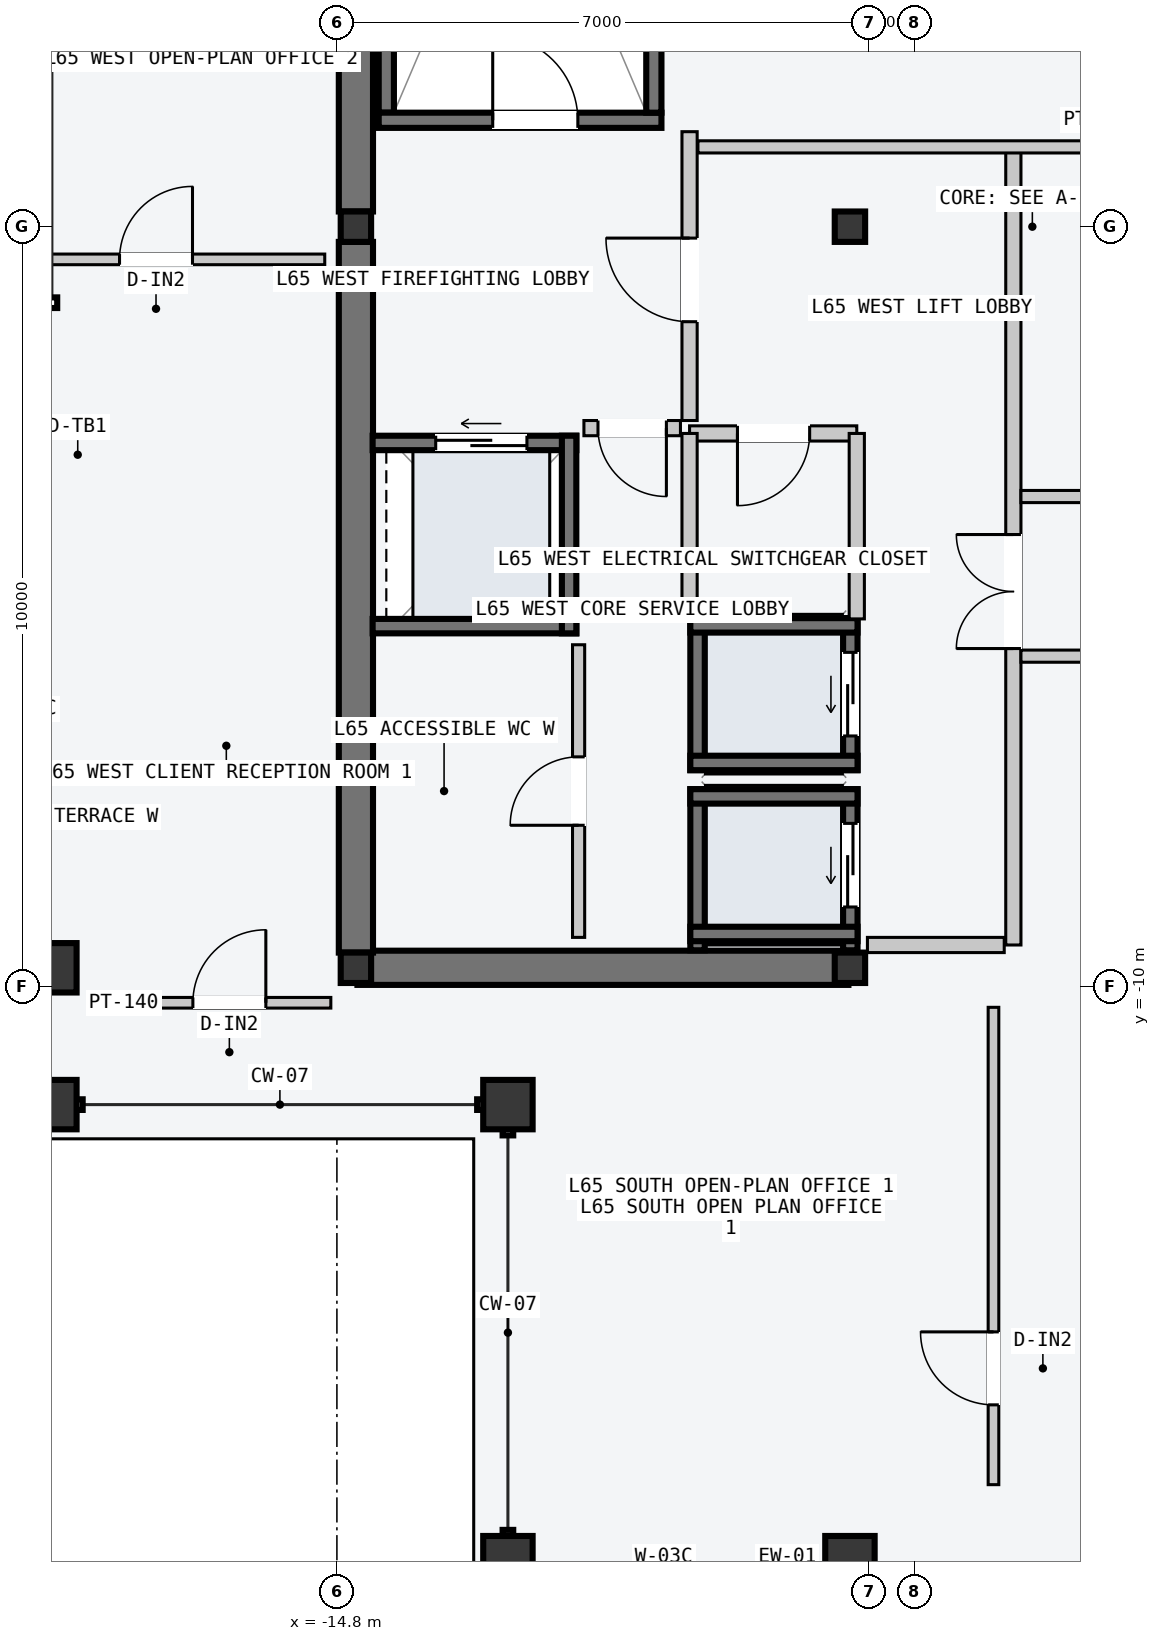
"""IFC4 building model, lengths in metres.
Left out: names, types, materials, properties, quantities, classifications, styles, units other than length and angle.
Written with IfcOpenShell. Run it as: python <this file> out.ifc"""

import sys

from ifc_helpers import new_model, si_unit, direction, frame, frame_2d, origin, origin_2d, place, context, subcontext, project, spatial, rectangle, hollow_rectangle, i_section, extrude, element, fill, save


model = new_model("IFC4")
c1 = context("Model", 3, precision=1e-05, world=origin(), true_north=direction((0.0, 1.0)))
c2 = subcontext(c1, "Body", "Model", "MODEL_VIEW")
j1 = project(units=[si_unit("LENGTHUNIT", "METRE"), si_unit("PLANEANGLEUNIT", "RADIAN")], contexts=[c1])
p1 = place(None, origin())
s1 = spatial("IfcSite", under=j1, at=p1, CompositionType="ELEMENT")
p2 = place(p1, origin())
s2 = spatial("IfcBuilding", under=s1, at=p2, CompositionType="ELEMENT")
p3 = place(p2, frame((0.0, 0.0, 247.2)))
s3 = spatial("IfcBuildingStorey", under=s2, at=p3, CompositionType="ELEMENT", Elevation=247.2)
p4 = place(p3, frame((-14.53, -9.75, -0.2), z_axis=(0.0, 0.0, 1.0), x_axis=(1.0, 0.0, 0.0)))
e1 = element("IfcWall", 1, at=p4, inside=s3, PredefinedType="SHEAR", context=c2, shape_type="SweptSolid", body=[
    extrude(rectangle(XDim=6.46, YDim=0.45, at=frame_2d((3.23, 0.0))), origin(), (0.0, 0.0, 1.0), 3.6),
])
for number, where, z_axis, x_axis in (
    (2, (-14.55, -9.55, -0.2), (0.0, 0.0, 1.0), (0.0, 1.0, 0.0)),
    (3, (-14.55, 0.2, -0.2), (0.0, 0.0, 1.0), (0.0, 1.0, 0.0)),
):
    element("IfcWall", number, at=place(p3, frame(where, z_axis=z_axis, x_axis=x_axis)), inside=s3, PredefinedType="SHEAR", context=c2, shape_type="SweptSolid", body=[
        extrude(rectangle(XDim=9.35, YDim=0.45, at=frame_2d((4.675, 0.0))), origin(), (0.0, 0.0, 1.0), 3.6),
    ])
p5 = place(p3, frame((-14.15, 1.5, -0.2), z_axis=(0.0, 0.0, 1.0), x_axis=(0.0, 1.0, 0.0)))
e4 = element("IfcWall", 4, at=p5, inside=s3, PredefinedType="SOLIDWALL", context=c2, shape_type="SweptSolid", body=[
    extrude(rectangle(XDim=7.8, YDim=0.2, at=frame_2d((3.9, 0.0))), origin(), (0.0, 0.0, 1.0), 3.6),
])
p6 = place(p3, frame((-14.25, 1.4, -0.2), z_axis=(0.0, 0.0, 1.0), x_axis=(1.0, 0.0, 0.0)))
e5 = element("IfcWall", 5, at=p6, inside=s3, PredefinedType="SOLIDWALL", context=c2, shape_type="SweptSolid", body=[
    extrude(rectangle(XDim=3.72, YDim=0.2, at=frame_2d((1.86, 0.0))), origin(), (0.0, 0.0, 1.0), 3.6),
])
p7 = place(p6, frame((1.5, 0.0, 0.2)))
e6 = element("IfcOpeningElement", 6, at=p7, cuts=e5, PredefinedType="OPENING", context=c2, shape_type="SweptSolid", body=[
    extrude(rectangle(XDim=1.12, YDim=2.18, at=frame_2d((0.56, 1.09))), frame((0.0, 0.11, 0.0), z_axis=(0.0, -1.0, 0.0), x_axis=(1.0, 0.0, 0.0)), (0.0, 0.0, 1.0), 0.22),
])
p8 = place(p3, frame((-10.63, 1.5, -0.2), z_axis=(0.0, 0.0, 1.0), x_axis=(0.0, 1.0, 0.0)))
e7 = element("IfcWall", 7, at=p8, inside=s3, PredefinedType="SOLIDWALL", context=c2, shape_type="SweptSolid", body=[
    extrude(rectangle(XDim=7.8, YDim=0.2, at=frame_2d((3.9, 0.0))), origin(), (0.0, 0.0, 1.0), 3.6),
])
for number, where, z_axis, x_axis in (
    (8, (-14.55, -9.75, 0.0), (0.0, 0.0, 1.0), (1.0, 0.0, 0.0)),
    (9, (-14.55, 0.0, 0.0), (0.0, 0.0, 1.0), (1.0, 0.0, 0.0)),
    (10, (-8.05, -9.75, 0.0), (0.0, 0.0, 1.0), (1.0, 0.0, 0.0)),
    (11, (-8.05, 0.0, 0.0), (0.0, 0.0, 1.0), (1.0, 0.0, 0.0)),
):
    element("IfcColumn", number, at=place(p3, frame(where, z_axis=z_axis, x_axis=x_axis)), inside=s3, PredefinedType="COLUMN", context=c2, shape_type="SweptSolid", body=[
        extrude(i_section(OverallWidth=0.4, OverallDepth=0.4, WebThickness=0.013, FlangeThickness=0.021, at=origin_2d()), origin(), (0.0, 0.0, 1.0), 3.6),
    ])
for number, where, z_axis, x_axis in (
    (12, (-12.55, -17.55, 0.0), (0.0, 0.0, 1.0), (1.0, 0.0, 0.0)),
    (13, (-8.05, -17.55, 0.0), (0.0, 0.0, 1.0), (1.0, 0.0, 0.0)),
    (14, (-18.55, -11.55, 0.0), (0.0, 0.0, 1.0), (0.0, 1.0, 0.0)),
    (15, (-18.55, -9.75, 0.0), (0.0, 0.0, 1.0), (0.0, 1.0, 0.0)),
    (16, (-12.55, -11.55, 0.0), (0.0, 0.0, 1.0), (1.0, 0.0, 0.0)),
):
    element("IfcColumn", number, at=place(p3, frame(where, z_axis=z_axis, x_axis=x_axis)), inside=s3, PredefinedType="COLUMN", context=c2, shape_type="SweptSolid", body=[
        extrude(hollow_rectangle(XDim=0.65, YDim=0.65, WallThickness=0.028, at=origin_2d()), origin(), (0.0, 0.0, 1.0), 3.6),
    ])
p9 = place(p3, frame((-8.045, -9.52, -0.2), z_axis=(0.0, 0.0, 1.0), x_axis=(0.0, 1.0, 0.0)))
e17 = element("IfcWall", 17, at=p9, inside=s3, PredefinedType="SOLIDWALL", context=c2, shape_type="SweptSolid", body=[
    extrude(rectangle(XDim=2.12, YDim=0.19, at=frame_2d((1.06, 0.0))), origin(), (0.0, 0.0, 1.0), 3.6),
])
p10 = place(p9, frame((0.57, 0.0, 0.2)))
e18 = element("IfcOpeningElement", 18, at=p10, cuts=e17, PredefinedType="OPENING", context=c2, shape_type="SweptSolid", body=[
    extrude(rectangle(XDim=1.1, YDim=2.2, at=frame_2d((0.55, 1.1))), frame((0.0, 0.105, 0.0), z_axis=(0.0, -1.0, 0.0), x_axis=(1.0, 0.0, 0.0)), (0.0, 0.0, 1.0), 0.21),
])
p11 = place(p3, frame((-10.055, -9.52, -0.2), z_axis=(0.0, 0.0, 1.0), x_axis=(0.0, 1.0, 0.0)))
e19 = element("IfcWall", 19, at=p11, inside=s3, PredefinedType="SOLIDWALL", context=c2, shape_type="SweptSolid", body=[
    extrude(rectangle(XDim=2.12, YDim=0.19, at=frame_2d((1.06, 0.0))), origin(), (0.0, 0.0, 1.0), 3.6),
])
for number, where, z_axis, x_axis in (
    (20, (-10.15, -7.495, -0.2), (0.0, 0.0, 1.0), (1.0, 0.0, 0.0)),
    (21, (-10.15, -9.305, -0.2), (0.0, 0.0, 1.0), (1.0, 0.0, 0.0)),
):
    element("IfcWall", number, at=place(p3, frame(where, z_axis=z_axis, x_axis=x_axis)), inside=s3, PredefinedType="SOLIDWALL", context=c2, shape_type="SweptSolid", body=[
        extrude(rectangle(XDim=2.2, YDim=0.19, at=frame_2d((1.1, 0.0))), origin(), (0.0, 0.0, 1.0), 3.6),
    ])
p12 = place(p3, frame((-8.045, -7.15, -0.2), z_axis=(0.0, 0.0, 1.0), x_axis=(0.0, 1.0, 0.0)))
e22 = element("IfcWall", 22, at=p12, inside=s3, PredefinedType="SOLIDWALL", context=c2, shape_type="SweptSolid", body=[
    extrude(rectangle(XDim=2.0, YDim=0.19, at=frame_2d((1.0, 0.0))), origin(), (0.0, 0.0, 1.0), 3.6),
])
p13 = place(p12, frame((0.45, 0.0, 0.2)))
e23 = element("IfcOpeningElement", 23, at=p13, cuts=e22, PredefinedType="OPENING", context=c2, shape_type="SweptSolid", body=[
    extrude(rectangle(XDim=1.1, YDim=2.2, at=frame_2d((0.55, 1.1))), frame((0.0, 0.105, 0.0), z_axis=(0.0, -1.0, 0.0), x_axis=(1.0, 0.0, 0.0)), (0.0, 0.0, 1.0), 0.21),
])
p14 = place(p3, frame((-10.055, -7.15, -0.2), z_axis=(0.0, 0.0, 1.0), x_axis=(0.0, 1.0, 0.0)))
e24 = element("IfcWall", 24, at=p14, inside=s3, PredefinedType="SOLIDWALL", context=c2, shape_type="SweptSolid", body=[
    extrude(rectangle(XDim=2.0, YDim=0.19, at=frame_2d((1.0, 0.0))), origin(), (0.0, 0.0, 1.0), 3.6),
])
for number, where, z_axis, x_axis in (
    (25, (-10.15, -5.245, -0.2), (0.0, 0.0, 1.0), (1.0, 0.0, 0.0)),
    (26, (-10.15, -7.055, -0.2), (0.0, 0.0, 1.0), (1.0, 0.0, 0.0)),
):
    element("IfcWall", number, at=place(p3, frame(where, z_axis=z_axis, x_axis=x_axis)), inside=s3, PredefinedType="SOLIDWALL", context=c2, shape_type="SweptSolid", body=[
        extrude(rectangle(XDim=2.2, YDim=0.19, at=frame_2d((1.1, 0.0))), origin(), (0.0, 0.0, 1.0), 3.6),
    ])
p15 = place(p3, frame((-14.33, -2.845, -0.2), z_axis=(0.0, 0.0, 1.0), x_axis=(1.0, 0.0, 0.0)))
e27 = element("IfcWall", 27, at=p15, inside=s3, PredefinedType="SOLIDWALL", context=c2, shape_type="SweptSolid", body=[
    extrude(rectangle(XDim=2.68, YDim=0.19, at=frame_2d((1.34, 0.0))), origin(), (0.0, 0.0, 1.0), 3.6),
])
p16 = place(p15, frame((0.83, 0.0, 0.2)))
e28 = element("IfcOpeningElement", 28, at=p16, cuts=e27, PredefinedType="OPENING", context=c2, shape_type="SweptSolid", body=[
    extrude(rectangle(XDim=1.2, YDim=2.2, at=frame_2d((0.6, 1.1))), frame((0.0, 0.105, 0.0), z_axis=(0.0, -1.0, 0.0), x_axis=(1.0, 0.0, 0.0)), (0.0, 0.0, 1.0), 0.21),
])
p17 = place(p3, frame((-14.33, -5.255, -0.2), z_axis=(0.0, 0.0, 1.0), x_axis=(1.0, 0.0, 0.0)))
e29 = element("IfcWall", 29, at=p17, inside=s3, PredefinedType="SOLIDWALL", context=c2, shape_type="SweptSolid", body=[
    extrude(rectangle(XDim=2.68, YDim=0.19, at=frame_2d((1.34, 0.0))), origin(), (0.0, 0.0, 1.0), 3.6),
])
p18 = place(p3, frame((-11.745, -5.35, -0.2), z_axis=(0.0, 0.0, 1.0), x_axis=(0.0, 1.0, 0.0)))
e30 = element("IfcWall", 30, at=p18, inside=s3, PredefinedType="SOLIDWALL", context=c2, shape_type="SweptSolid", body=[
    extrude(rectangle(XDim=2.6, YDim=0.19, at=frame_2d((1.3, 0.0))), origin(), (0.0, 0.0, 1.0), 3.6),
])
p19 = place(p3, frame((-5.9, -9.45, 0.0), z_axis=(0.0, 0.0, 1.0), x_axis=(0.0, 1.0, 0.0)))
e31 = element("IfcWall", 31, at=p19, inside=s3, PredefinedType="PARTITIONING", context=c2, shape_type="SweptSolid", body=[
    extrude(rectangle(XDim=10.5, YDim=0.2, at=frame_2d((5.25, 0.0))), origin(), (0.0, 0.0, 1.0), 3.4),
])
p20 = place(p19, frame((3.9, 0.0, 0.0)))
e32 = element("IfcOpeningElement", 32, at=p20, cuts=e31, PredefinedType="OPENING", context=c2, shape_type="SweptSolid", body=[
    extrude(rectangle(XDim=1.5, YDim=2.2, at=frame_2d((0.75, 1.1))), frame((0.0, 0.11, 0.0), z_axis=(0.0, -1.0, 0.0), x_axis=(1.0, 0.0, 0.0)), (0.0, 0.0, 1.0), 0.22),
])
p21 = place(p3, frame((-6.02, -9.45, 0.0), z_axis=(0.0, 0.0, 1.0), x_axis=(-1.0, 0.0, 0.0)))
e33 = element("IfcWall", 33, at=p21, inside=s3, PredefinedType="PARTITIONING", context=c2, shape_type="SweptSolid", body=[
    extrude(rectangle(XDim=1.8, YDim=0.2, at=frame_2d((0.9, 0.0))), origin(), (0.0, 0.0, 1.0), 3.4),
])
p22 = place(p3, frame((-10.16, -2.55, 0.0), z_axis=(0.0, 0.0, 1.0), x_axis=(0.0, 1.0, 0.0)))
e34 = element("IfcWall", 34, at=p22, inside=s3, PredefinedType="PARTITIONING", context=c2, shape_type="SweptSolid", body=[
    extrude(rectangle(XDim=3.8, YDim=0.2, at=frame_2d((1.9, 0.0))), origin(), (0.0, 0.0, 1.0), 3.4),
])
p23 = place(p22, frame((1.3, 0.0, 0.0)))
e35 = element("IfcOpeningElement", 35, at=p23, cuts=e34, PredefinedType="OPENING", context=c2, shape_type="SweptSolid", body=[
    extrude(rectangle(XDim=1.1, YDim=2.15, at=frame_2d((0.55, 1.075))), frame((0.0, 0.11, 0.0), z_axis=(0.0, -1.0, 0.0), x_axis=(1.0, 0.0, 0.0)), (0.0, 0.0, 1.0), 0.22),
])
p24 = place(p3, frame((-10.28, -2.65, 0.0), z_axis=(0.0, 0.0, 1.0), x_axis=(-1.0, 0.0, 0.0)))
e36 = element("IfcWall", 36, at=p24, inside=s3, PredefinedType="PARTITIONING", context=c2, shape_type="SweptSolid", body=[
    extrude(rectangle(XDim=1.27, YDim=0.2, at=frame_2d((0.635, 0.0))), origin(), (0.0, 0.0, 1.0), 3.4),
])
p25 = place(p24, frame((0.185, 0.0, 0.0)))
e37 = element("IfcOpeningElement", 37, at=p25, cuts=e36, PredefinedType="OPENING", context=c2, shape_type="SweptSolid", body=[
    extrude(rectangle(XDim=0.9, YDim=2.15, at=frame_2d((0.45, 1.075))), frame((0.0, 0.11, 0.0), z_axis=(0.0, -1.0, 0.0), x_axis=(1.0, 0.0, 0.0)), (0.0, 0.0, 1.0), 0.22),
])
p26 = place(p3, frame((-7.96, -2.72, 0.0), z_axis=(0.0, 0.0, 1.0), x_axis=(-1.0, 0.0, 0.0)))
e38 = element("IfcWall", 38, at=p26, inside=s3, PredefinedType="PARTITIONING", context=c2, shape_type="SweptSolid", body=[
    extrude(rectangle(XDim=2.2, YDim=0.2, at=frame_2d((1.1, 0.0))), origin(), (0.0, 0.0, 1.0), 3.4),
])
p27 = place(p26, frame((0.62, 0.0, 0.0)))
e39 = element("IfcOpeningElement", 39, at=p27, cuts=e38, PredefinedType="OPENING", context=c2, shape_type="SweptSolid", body=[
    extrude(rectangle(XDim=0.95, YDim=2.1, at=frame_2d((0.475, 1.05))), frame((0.0, 0.11, 0.0), z_axis=(0.0, -1.0, 0.0), x_axis=(1.0, 0.0, 0.0)), (0.0, 0.0, 1.0), 0.22),
])
for number, where, z_axis, x_axis in (
    (40, (-7.96, -5.16, 0.0), (0.0, 0.0, 1.0), (0.0, 1.0, 0.0)),
    (41, (-10.16, -5.16, 0.0), (0.0, 0.0, 1.0), (0.0, 1.0, 0.0)),
):
    element("IfcWall", number, at=place(p3, frame(where, z_axis=z_axis, x_axis=x_axis)), inside=s3, PredefinedType="PARTITIONING", context=c2, shape_type="SweptSolid", body=[
        extrude(rectangle(XDim=2.44, YDim=0.2, at=frame_2d((1.22, 0.0))), origin(), (0.0, 0.0, 1.0), 3.4),
    ])
p28 = place(p3, frame((-11.62, -9.35, 0.0), z_axis=(0.0, 0.0, 1.0), x_axis=(0.0, 1.0, 0.0)))
e42 = element("IfcWall", 42, at=p28, inside=s3, PredefinedType="PARTITIONING", context=c2, shape_type="SweptSolid", body=[
    extrude(rectangle(XDim=3.85, YDim=0.16, at=frame_2d((1.925, 0.0))), origin(), (0.0, 0.0, 1.0), 3.4),
])
p29 = place(p28, frame((1.475, 0.0, 0.0)))
e43 = element("IfcOpeningElement", 43, at=p29, cuts=e42, PredefinedType="OPENING", context=c2, shape_type="SweptSolid", body=[
    extrude(rectangle(XDim=0.9, YDim=2.15, at=frame_2d((0.45, 1.075))), frame((0.0, 0.09, 0.0), z_axis=(0.0, -1.0, 0.0), x_axis=(1.0, 0.0, 0.0)), (0.0, 0.0, 1.0), 0.18),
])
p30 = place(p3, frame((-10.05, 1.05, 0.0), z_axis=(0.0, 0.0, 1.0), x_axis=(1.0, 0.0, 0.0)))
e44 = element("IfcWall", 44, at=p30, inside=s3, PredefinedType="PARTITIONING", context=c2, shape_type="SweptSolid", body=[
    extrude(rectangle(XDim=10.54, YDim=0.16, at=frame_2d((5.27, 0.0))), origin(), (0.0, 0.0, 1.0), 3.4),
])
for number, where, z_axis, x_axis in (
    (45, (-5.8, -3.55, 0.0), (0.0, 0.0, 1.0), (1.0, 0.0, 0.0)),
    (46, (-5.8, -5.65, 0.0), (0.0, 0.0, 1.0), (1.0, 0.0, 0.0)),
):
    element("IfcWall", number, at=place(p3, frame(where, z_axis=z_axis, x_axis=x_axis)), inside=s3, PredefinedType="PARTITIONING", context=c2, shape_type="SweptSolid", body=[
        extrude(rectangle(XDim=6.29, YDim=0.16, at=frame_2d((3.145, 0.0))), origin(), (0.0, 0.0, 1.0), 3.4),
    ])
p31 = place(p3, frame((-6.161, -16.55, 0.0), z_axis=(0.0, 0.0, 1.0), x_axis=(0.0, 1.0, 0.0)))
e47 = element("IfcWall", 47, at=p31, inside=s3, PredefinedType="PARTITIONING", context=c2, shape_type="SweptSolid", body=[
    extrude(rectangle(XDim=6.28, YDim=0.14, at=frame_2d((3.14, 0.0))), origin(), (0.0, 0.0, 1.0), 3.4),
])
p32 = place(p31, frame((1.05, 0.0, 0.0)))
e48 = element("IfcOpeningElement", 48, at=p32, cuts=e47, PredefinedType="OPENING", context=c2, shape_type="SweptSolid", body=[
    extrude(rectangle(XDim=0.96, YDim=2.18, at=frame_2d((0.48, 1.09))), frame((0.0, 0.08, 0.0), z_axis=(0.0, -1.0, 0.0), x_axis=(1.0, 0.0, 0.0)), (0.0, 0.0, 1.0), 0.16),
])
p33 = place(p3, frame((-17.55, -10.21, 0.0), z_axis=(0.0, 0.0, 1.0), x_axis=(1.0, 0.0, 0.0)))
e49 = element("IfcWall", 49, at=p33, inside=s3, PredefinedType="PARTITIONING", context=c2, shape_type="SweptSolid", body=[
    extrude(rectangle(XDim=2.67, YDim=0.14, at=frame_2d((1.335, 0.0))), origin(), (0.0, 0.0, 1.0), 3.4),
])
p34 = place(p33, frame((0.855, 0.0, 0.0)))
e50 = element("IfcOpeningElement", 50, at=p34, cuts=e49, PredefinedType="OPENING", context=c2, shape_type="SweptSolid", body=[
    extrude(rectangle(XDim=0.96, YDim=2.18, at=frame_2d((0.48, 1.09))), frame((0.0, 0.08, 0.0), z_axis=(0.0, -1.0, 0.0), x_axis=(1.0, 0.0, 0.0)), (0.0, 0.0, 1.0), 0.16),
])
p35 = place(p3, frame((-18.56, -0.43, 0.0), z_axis=(0.0, 0.0, 1.0), x_axis=(1.0, 0.0, 0.0)))
e51 = element("IfcWall", 51, at=p35, inside=s3, PredefinedType="PARTITIONING", context=c2, shape_type="SweptSolid", body=[
    extrude(rectangle(XDim=3.6, YDim=0.14, at=frame_2d((1.8, 0.0))), origin(), (0.0, 0.0, 1.0), 3.4),
])
p36 = place(p35, frame((0.9, 0.0, 0.0)))
e52 = element("IfcOpeningElement", 52, at=p36, cuts=e51, PredefinedType="OPENING", context=c2, shape_type="SweptSolid", body=[
    extrude(rectangle(XDim=0.96, YDim=2.18, at=frame_2d((0.48, 1.09))), frame((0.0, 0.08, 0.0), z_axis=(0.0, -1.0, 0.0), x_axis=(1.0, 0.0, 0.0)), (0.0, 0.0, 1.0), 0.16),
])
p37 = place(p7, origin())
e53 = element("IfcDoor", 53, at=p37, inside=s3, OperationType="SINGLE_SWING_LEFT", PredefinedType="DOOR", context=c2, shape_type="SweptSolid", body=[
    extrude(rectangle(XDim=1.12, YDim=2.18, at=frame_2d((0.56, 1.09))), frame((0.0, 0.025, 0.0), z_axis=(0.0, -1.0, 0.0), x_axis=(1.0, 0.0, 0.0)), (0.0, 0.0, 1.0), 0.05),
])
fill(e6, e53)
p38 = place(p10, origin())
e54 = element("IfcDoor", 54, at=p38, inside=s3, OperationType="SLIDING_TO_LEFT", PredefinedType="DOOR", context=c2, shape_type="SweptSolid", body=[
    extrude(rectangle(XDim=1.1, YDim=2.2, at=frame_2d((0.55, 1.1))), frame((0.0, 0.025, 0.0), z_axis=(0.0, -1.0, 0.0), x_axis=(1.0, 0.0, 0.0)), (0.0, 0.0, 1.0), 0.05),
])
fill(e18, e54)
p39 = place(p13, origin())
e55 = element("IfcDoor", 55, at=p39, inside=s3, OperationType="SLIDING_TO_LEFT", PredefinedType="DOOR", context=c2, shape_type="SweptSolid", body=[
    extrude(rectangle(XDim=1.1, YDim=2.2, at=frame_2d((0.55, 1.1))), frame((0.0, 0.025, 0.0), z_axis=(0.0, -1.0, 0.0), x_axis=(1.0, 0.0, 0.0)), (0.0, 0.0, 1.0), 0.05),
])
fill(e23, e55)
p40 = place(p16, origin())
e56 = element("IfcDoor", 56, at=p40, inside=s3, OperationType="SLIDING_TO_LEFT", PredefinedType="DOOR", context=c2, shape_type="SweptSolid", body=[
    extrude(rectangle(XDim=1.2, YDim=2.2, at=frame_2d((0.6, 1.1))), frame((0.0, 0.025, 0.0), z_axis=(0.0, -1.0, 0.0), x_axis=(1.0, 0.0, 0.0)), (0.0, 0.0, 1.0), 0.05),
])
fill(e28, e56)
p41 = place(p20, origin())
e57 = element("IfcDoor", 57, at=p41, inside=s3, OperationType="DOUBLE_DOOR_SINGLE_SWING", PredefinedType="DOOR", context=c2, shape_type="SweptSolid", body=[
    extrude(rectangle(XDim=1.5, YDim=2.2, at=frame_2d((0.75, 1.1))), frame((0.0, 0.025, 0.0), z_axis=(0.0, -1.0, 0.0), x_axis=(1.0, 0.0, 0.0)), (0.0, 0.0, 1.0), 0.05),
])
fill(e32, e57)
p42 = place(p23, origin())
e58 = element("IfcDoor", 58, at=p42, inside=s3, OperationType="SINGLE_SWING_RIGHT", PredefinedType="DOOR", context=c2, shape_type="SweptSolid", body=[
    extrude(rectangle(XDim=1.1, YDim=2.15, at=frame_2d((0.55, 1.075))), frame((0.0, 0.025, 0.0), z_axis=(0.0, -1.0, 0.0), x_axis=(1.0, 0.0, 0.0)), (0.0, 0.0, 1.0), 0.05),
])
fill(e35, e58)
p43 = place(p25, origin())
e59 = element("IfcDoor", 59, at=p43, inside=s3, OperationType="SINGLE_SWING_LEFT", PredefinedType="DOOR", context=c2, shape_type="SweptSolid", body=[
    extrude(rectangle(XDim=0.9, YDim=2.15, at=frame_2d((0.45, 1.075))), frame((0.0, 0.025, 0.0), z_axis=(0.0, -1.0, 0.0), x_axis=(1.0, 0.0, 0.0)), (0.0, 0.0, 1.0), 0.05),
])
fill(e37, e59)
p44 = place(p27, origin())
e60 = element("IfcDoor", 60, at=p44, inside=s3, OperationType="SINGLE_SWING_RIGHT", PredefinedType="DOOR", context=c2, shape_type="SweptSolid", body=[
    extrude(rectangle(XDim=0.95, YDim=2.1, at=frame_2d((0.475, 1.05))), frame((0.0, 0.025, 0.0), z_axis=(0.0, -1.0, 0.0), x_axis=(1.0, 0.0, 0.0)), (0.0, 0.0, 1.0), 0.05),
])
fill(e39, e60)
p45 = place(p29, origin())
e61 = element("IfcDoor", 61, at=p45, inside=s3, OperationType="SINGLE_SWING_LEFT", PredefinedType="DOOR", context=c2, shape_type="SweptSolid", body=[
    extrude(rectangle(XDim=0.9, YDim=2.15, at=frame_2d((0.45, 1.075))), frame((0.0, 0.025, 0.0), z_axis=(0.0, -1.0, 0.0), x_axis=(1.0, 0.0, 0.0)), (0.0, 0.0, 1.0), 0.05),
])
fill(e43, e61)
p46 = place(p32, origin())
e62 = element("IfcDoor", 62, at=p46, inside=s3, OperationType="SINGLE_SWING_RIGHT", PredefinedType="DOOR", context=c2, shape_type="SweptSolid", body=[
    extrude(rectangle(XDim=0.96, YDim=2.18, at=frame_2d((0.48, 1.09))), frame((0.0, 0.025, 0.0), z_axis=(0.0, -1.0, 0.0), x_axis=(1.0, 0.0, 0.0)), (0.0, 0.0, 1.0), 0.05),
])
fill(e48, e62)
p47 = place(p34, origin())
e63 = element("IfcDoor", 63, at=p47, inside=s3, OperationType="SINGLE_SWING_RIGHT", PredefinedType="DOOR", context=c2, shape_type="SweptSolid", body=[
    extrude(rectangle(XDim=0.96, YDim=2.18, at=frame_2d((0.48, 1.09))), frame((0.0, 0.025, 0.0), z_axis=(0.0, -1.0, 0.0), x_axis=(1.0, 0.0, 0.0)), (0.0, 0.0, 1.0), 0.05),
])
fill(e50, e63)
p48 = place(p36, origin())
e64 = element("IfcDoor", 64, at=p48, inside=s3, OperationType="SINGLE_SWING_RIGHT", PredefinedType="DOOR", context=c2, shape_type="SweptSolid", body=[
    extrude(rectangle(XDim=0.96, YDim=2.18, at=frame_2d((0.48, 1.09))), frame((0.0, 0.025, 0.0), z_axis=(0.0, -1.0, 0.0), x_axis=(1.0, 0.0, 0.0)), (0.0, 0.0, 1.0), 0.05),
])
fill(e52, e64)
save(model, sys.argv[1])
